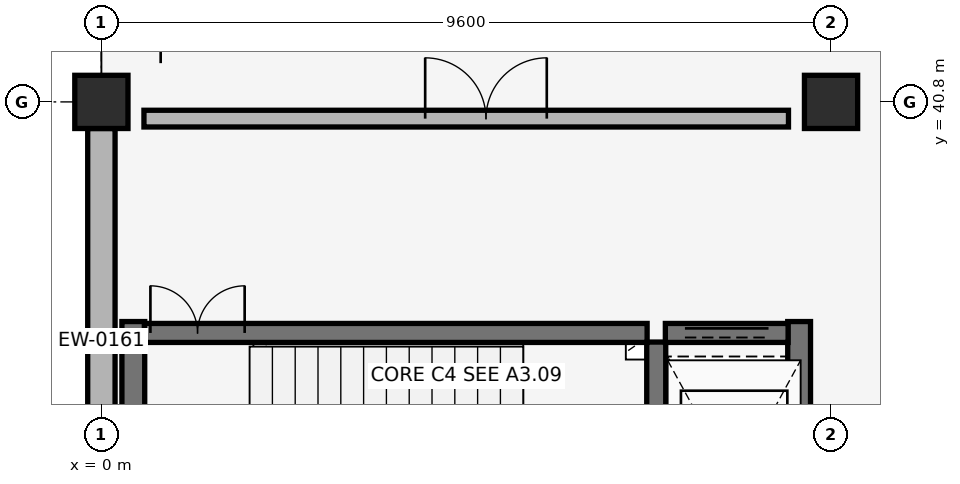
"""IFC4 building model, lengths in metres.
Left out: names, types, materials, properties, quantities, classifications, styles, units other than length and angle.
Written with IfcOpenShell. Run it as: python <this file> out.ifc"""

import sys

from ifc_helpers import new_model, si_unit, direction, frame, frame_2d, origin, origin_2d, place, context, subcontext, project, spatial, rectangle, circle, extrude, element, fill, save


model = new_model("IFC4")
c1 = context("Model", 3, precision=1e-05, world=origin(), true_north=direction((0.0, 1.0)))
c2 = subcontext(c1, "Body", "Model", "MODEL_VIEW")
j1 = project(units=[si_unit("LENGTHUNIT", "METRE"), si_unit("PLANEANGLEUNIT", "RADIAN")], contexts=[c1])
p1 = place(None, origin())
s1 = spatial("IfcSite", under=j1, at=p1, CompositionType="ELEMENT")
p2 = place(p1, origin())
s2 = spatial("IfcBuilding", under=s1, at=p2, CompositionType="ELEMENT")
p3 = place(p2, origin())
s3 = spatial("IfcBuildingStorey", under=s2, at=p3, CompositionType="ELEMENT", Elevation=0.0)
for number, where, z_axis, x_axis in (
    (1, (0.0, 40.8, 0.0), (0.0, 0.0, 1.0), (1.0, 0.0, 0.0)),
    (2, (9.6, 40.8, 0.0), (0.0, 0.0, 1.0), (1.0, 0.0, 0.0)),
):
    element("IfcColumn", number, at=place(p3, frame(where, z_axis=z_axis, x_axis=x_axis)), inside=s3, PredefinedType="COLUMN", context=c2, shape_type="SweptSolid", body=[
        extrude(circle(Radius=0.35, at=origin_2d()), origin(), (0.0, 0.0, 1.0), 4.42),
    ])
p4 = place(p3, frame((0.0, 40.45, 0.0), z_axis=(0.0, 0.0, 1.0), x_axis=(0.0, -1.0, 0.0)))
e3 = element("IfcWall", 3, at=p4, inside=s3, PredefinedType="SOLIDWALL", context=c2, shape_type="SweptSolid", body=[
    extrude(rectangle(XDim=6.5, YDim=0.36, at=frame_2d((3.25, 0.0))), origin(), (0.0, 0.0, 1.0), 3.4),
])
for number, where, z_axis, x_axis in (
    (4, (0.42, 33.81, 0.0), (0.0, 0.0, 1.0), (0.0, 1.0, 0.0)),
    (5, (9.18, 33.81, 0.0), (0.0, 0.0, 1.0), (0.0, 1.0, 0.0)),
):
    element("IfcWall", number, at=place(p3, frame(where, z_axis=z_axis, x_axis=x_axis)), inside=s3, PredefinedType="SHEAR", context=c2, shape_type="SweptSolid", body=[
        extrude(rectangle(XDim=4.1, YDim=0.3, at=frame_2d((2.05, 0.0))), origin(), (0.0, 0.0, 1.0), 4.12),
    ])
p5 = place(p3, frame((7.3, 34.11, 0.0), z_axis=(0.0, 0.0, 1.0), x_axis=(0.0, 1.0, 0.0)))
e6 = element("IfcWall", 6, at=p5, inside=s3, PredefinedType="SHEAR", context=c2, shape_type="SweptSolid", body=[
    extrude(rectangle(XDim=3.53, YDim=0.25, at=frame_2d((1.765, 0.0))), origin(), (0.0, 0.0, 1.0), 4.12),
])
p6 = place(p3, frame((0.565, 37.76, 0.0), z_axis=(0.0, 0.0, 1.0), x_axis=(1.0, 0.0, 0.0)))
e7 = element("IfcWall", 7, at=p6, inside=s3, PredefinedType="SHEAR", context=c2, shape_type="SweptSolid", body=[
    extrude(rectangle(XDim=6.615, YDim=0.25, at=frame_2d((3.308, 0.0))), origin(), (0.0, 0.0, 1.0), 4.12),
])
p7 = place(p6, frame((0.08, 0.0, 0.0)))
e8 = element("IfcOpeningElement", 8, at=p7, cuts=e7, PredefinedType="OPENING", context=c2, shape_type="SweptSolid", body=[
    extrude(rectangle(XDim=1.24, YDim=2.15, at=frame_2d((0.62, 1.075))), frame((0.0, 0.135, 0.0), z_axis=(0.0, -1.0, 0.0), x_axis=(1.0, 0.0, 0.0)), (0.0, 0.0, 1.0), 0.27),
])
p8 = place(p3, frame((0.56, 40.58, 0.0), z_axis=(0.0, 0.0, 1.0), x_axis=(1.0, 0.0, 0.0)))
e9 = element("IfcWall", 9, at=p8, inside=s3, PredefinedType="PARTITIONING", context=c2, shape_type="SweptSolid", body=[
    extrude(rectangle(XDim=8.48, YDim=0.22, at=frame_2d((4.24, 0.0))), origin(), (0.0, 0.0, 1.0), 3.45),
])
p9 = place(p8, frame((3.7, 0.0, 0.0)))
e10 = element("IfcOpeningElement", 10, at=p9, cuts=e9, PredefinedType="OPENING", context=c2, shape_type="SweptSolid", body=[
    extrude(rectangle(XDim=1.6, YDim=2.2, at=frame_2d((0.8, 1.1))), frame((0.0, 0.12, 0.0), z_axis=(0.0, -1.0, 0.0), x_axis=(1.0, 0.0, 0.0)), (0.0, 0.0, 1.0), 0.24),
])
p10 = place(p3, frame((7.42, 37.76, 0.0), z_axis=(0.0, 0.0, 1.0), x_axis=(1.0, 0.0, 0.0)))
e11 = element("IfcWall", 11, at=p10, inside=s3, PredefinedType="SHEAR", context=c2, shape_type="SweptSolid", body=[
    extrude(rectangle(XDim=1.615, YDim=0.25, at=frame_2d((0.808, 0.0))), origin(), (0.0, 0.0, 1.0), 4.12),
])
p11 = place(p10, frame((0.258, 0.0, 0.0)))
e12 = element("IfcOpeningElement", 12, at=p11, cuts=e11, PredefinedType="OPENING", context=c2, shape_type="SweptSolid", body=[
    extrude(rectangle(XDim=1.1, YDim=2.15, at=frame_2d((0.55, 1.075))), frame((0.0, 0.135, 0.0), z_axis=(0.0, -1.0, 0.0), x_axis=(1.0, 0.0, 0.0)), (0.0, 0.0, 1.0), 0.27),
])
p12 = place(p7, origin())
e13 = element("IfcDoor", 13, at=p12, inside=s3, OperationType="DOUBLE_DOOR_SINGLE_SWING", PredefinedType="DOOR", context=c2, shape_type="SweptSolid", body=[
    extrude(rectangle(XDim=1.24, YDim=2.15, at=frame_2d((0.62, 1.075))), frame((0.0, 0.025, 0.0), z_axis=(0.0, -1.0, 0.0), x_axis=(1.0, 0.0, 0.0)), (0.0, 0.0, 1.0), 0.05),
])
fill(e8, e13)
p13 = place(p9, origin())
e14 = element("IfcDoor", 14, at=p13, inside=s3, OperationType="DOUBLE_DOOR_SINGLE_SWING", PredefinedType="DOOR", context=c2, shape_type="SweptSolid", body=[
    extrude(rectangle(XDim=1.6, YDim=2.2, at=frame_2d((0.8, 1.1))), frame((0.0, 0.025, 0.0), z_axis=(0.0, -1.0, 0.0), x_axis=(1.0, 0.0, 0.0)), (0.0, 0.0, 1.0), 0.05),
])
fill(e10, e14)
p14 = place(p11, origin())
e15 = element("IfcDoor", 15, at=p14, inside=s3, OperationType="DOUBLE_DOOR_SLIDING", PredefinedType="DOOR", context=c2, shape_type="SweptSolid", body=[
    extrude(rectangle(XDim=1.1, YDim=2.15, at=frame_2d((0.55, 1.075))), frame((0.0, 0.025, 0.0), z_axis=(0.0, -1.0, 0.0), x_axis=(1.0, 0.0, 0.0)), (0.0, 0.0, 1.0), 0.05),
])
fill(e12, e15)
save(model, sys.argv[1])
